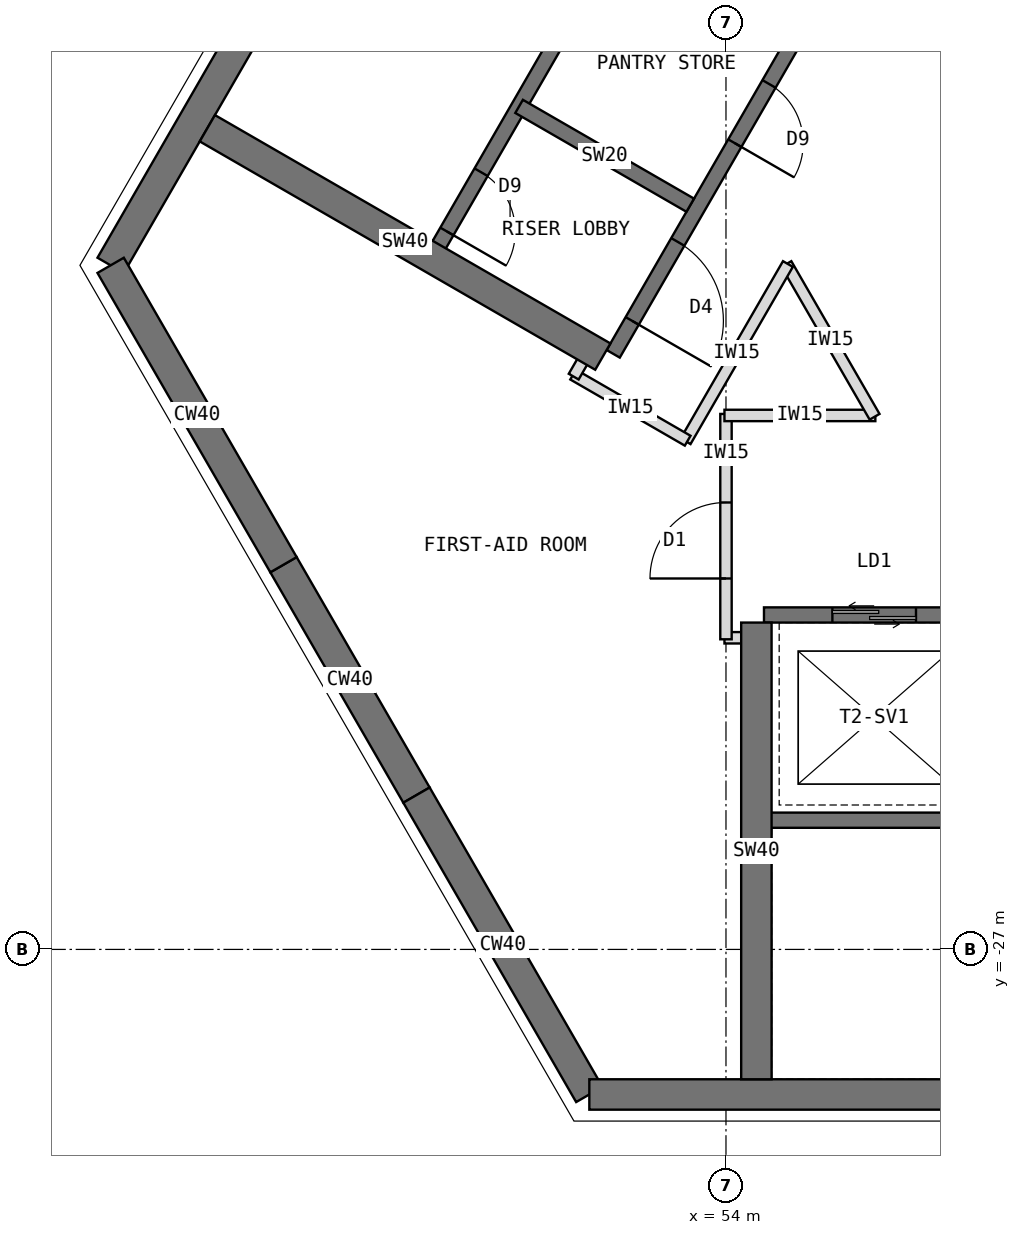
"""IFC4 building model, lengths in metres.
Left out: names, types, materials, properties, quantities, classifications, styles, units other than length and angle.
Written with IfcOpenShell. Run it as: python <this file> out.ifc"""

import sys

from ifc_helpers import new_model, si_unit, direction, frame, frame_2d, origin, place, context, subcontext, project, spatial, rectangle, extrude, element, fill, save


model = new_model("IFC4")
c1 = context("Model", 3, precision=1e-05, world=origin(), true_north=direction((0.0, 1.0)))
c2 = subcontext(c1, "Body", "Model", "MODEL_VIEW")
j1 = project(units=[si_unit("LENGTHUNIT", "METRE"), si_unit("PLANEANGLEUNIT", "RADIAN")], contexts=[c1])
p1 = place(None, origin())
s1 = spatial("IfcSite", under=j1, at=p1, CompositionType="ELEMENT")
p2 = place(p1, origin())
s2 = spatial("IfcBuilding", under=s1, at=p2, CompositionType="ELEMENT")
p3 = place(p2, frame((0.0, 0.0, 279.5)))
s3 = spatial("IfcBuildingStorey", under=s2, at=p3, CompositionType="ELEMENT", Elevation=279.5)
p4 = place(p3, frame((52.202, -7.092, 0.0), z_axis=(0.0, 0.0, 1.0), x_axis=(-0.500005998175, -0.866021940709, 0.0)))
e1 = element("IfcWall", 1, at=p4, inside=s3, PredefinedType="SHEAR", context=c2, shape_type="SweptSolid", body=[
    extrude(rectangle(XDim=12.596, YDim=0.4, at=frame_2d((6.298, 0.0))), origin(), (0.0, 0.0, 1.0), 4.0),
])
p5 = place(p3, frame((45.904, -18.0, 0.0), z_axis=(0.0, 0.0, 1.0), x_axis=(0.500024481964, -0.866011268655, 0.0)))
e2 = element("IfcWall", 2, at=p5, inside=s3, PredefinedType="SHEAR", context=c2, shape_type="SweptSolid", body=[
    extrude(rectangle(XDim=4.548, YDim=0.4, at=frame_2d((2.274, 0.0))), origin(), (0.0, 0.0, 1.0), 4.0),
])
p6 = place(p3, frame((48.178, -21.939, 0.0), z_axis=(0.0, 0.0, 1.0), x_axis=(0.500010275428, -0.866019471182, 0.0)))
e3 = element("IfcWall", 3, at=p6, inside=s3, PredefinedType="SHEAR", context=c2, shape_type="SweptSolid", body=[
    extrude(rectangle(XDim=3.5, YDim=0.4, at=frame_2d((1.75, 0.0))), origin(), (0.0, 0.0, 1.0), 4.0),
])
p7 = place(p3, frame((49.928, -24.97, 0.0), z_axis=(0.0, 0.0, 1.0), x_axis=(0.499984222037, -0.866034513004, 0.0)))
e4 = element("IfcWall", 4, at=p7, inside=s3, PredefinedType="SHEAR", context=c2, shape_type="SweptSolid", body=[
    extrude(rectangle(XDim=4.548, YDim=0.4, at=frame_2d((2.274, 0.0))), origin(), (0.0, 0.0, 1.0), 4.0),
])
p8 = place(p3, frame((52.202, -28.908, 0.0), z_axis=(0.0, 0.0, 1.0), x_axis=(1.0, 0.0, 0.0)))
e5 = element("IfcWall", 5, at=p8, inside=s3, PredefinedType="SHEAR", context=c2, shape_type="SweptSolid", body=[
    extrude(rectangle(XDim=12.596, YDim=0.4, at=frame_2d((6.298, 0.0))), origin(), (0.0, 0.0, 1.0), 4.0),
])
p9 = place(p3, frame((56.516, -12.236, 0.0), z_axis=(0.0, 0.0, 1.0), x_axis=(-0.49999894854, -0.866026010844, 0.0)))
e6 = element("IfcWall", 6, at=p9, inside=s3, PredefinedType="SHEAR", context=c2, shape_type="SweptSolid", body=[
    extrude(rectangle(XDim=8.0, YDim=0.2, at=frame_2d((4.0, 0.0))), origin(), (0.0, 0.0, 1.0), 4.0),
])
p10 = place(p9, frame((6.3, 0.0, 0.0)))
e7 = element("IfcOpeningElement", 7, at=p10, cuts=e6, PredefinedType="OPENING", context=c2, shape_type="SweptSolid", body=[
    extrude(rectangle(XDim=1.2, YDim=2.1, at=frame_2d((0.6, 1.05))), frame((0.0, 0.11, 0.0), z_axis=(0.0, -1.0, 0.0), x_axis=(1.0, 0.0, 0.0)), (0.0, 0.0, 1.0), 0.22),
])
p11 = place(p9, frame((1.0, 0.0, 0.0)))
e8 = element("IfcOpeningElement", 8, at=p11, cuts=e6, PredefinedType="OPENING", context=c2, shape_type="SweptSolid", body=[
    extrude(rectangle(XDim=0.9, YDim=2.1, at=frame_2d((0.45, 1.05))), frame((0.0, 0.11, 0.0), z_axis=(0.0, -1.0, 0.0), x_axis=(1.0, 0.0, 0.0)), (0.0, 0.0, 1.0), 0.22),
])
p12 = place(p9, frame((3.9, 0.0, 0.0)))
e9 = element("IfcOpeningElement", 9, at=p12, cuts=e6, PredefinedType="OPENING", context=c2, shape_type="SweptSolid", body=[
    extrude(rectangle(XDim=0.9, YDim=2.1, at=frame_2d((0.45, 1.05))), frame((0.0, 0.11, 0.0), z_axis=(0.0, -1.0, 0.0), x_axis=(1.0, 0.0, 0.0)), (0.0, 0.0, 1.0), 0.22),
])
p13 = place(p3, frame((53.53, -17.209, 0.0), z_axis=(0.0, 0.0, 1.0), x_axis=(-0.866062058628, 0.499936506574, 0.0)))
e10 = element("IfcWall", 10, at=p13, inside=s3, PredefinedType="SHEAR", context=c2, shape_type="SweptSolid", body=[
    extrude(rectangle(XDim=2.6, YDim=0.2, at=frame_2d((1.3, 0.0))), origin(), (0.0, 0.0, 1.0), 4.0),
])
p14 = place(p3, frame((54.178, -10.886, 0.0), z_axis=(0.0, 0.0, 1.0), x_axis=(-0.49999894854, -0.866026010844, 0.0)))
e11 = element("IfcWall", 11, at=p14, inside=s3, PredefinedType="SHEAR", context=c2, shape_type="SweptSolid", body=[
    extrude(rectangle(XDim=8.0, YDim=0.2, at=frame_2d((4.0, 0.0))), origin(), (0.0, 0.0, 1.0), 4.0),
])
p15 = place(p14, frame((6.8, 0.0, 0.0)))
e12 = element("IfcOpeningElement", 12, at=p15, cuts=e11, PredefinedType="OPENING", context=c2, shape_type="SweptSolid", body=[
    extrude(rectangle(XDim=0.9, YDim=2.1, at=frame_2d((0.45, 1.05))), frame((0.0, 0.11, 0.0), z_axis=(0.0, -1.0, 0.0), x_axis=(1.0, 0.0, 0.0)), (0.0, 0.0, 1.0), 0.22),
])
p16 = place(p3, frame((52.38, -19.201, 0.0), z_axis=(0.0, 0.0, 1.0), x_axis=(-0.866026570101, 0.499997979876, 0.0)))
e13 = element("IfcWall", 13, at=p16, inside=s3, PredefinedType="SHEAR", context=c2, shape_type="SweptSolid", body=[
    extrude(rectangle(XDim=6.008, YDim=0.4, at=frame_2d((3.004, 0.0))), origin(), (0.0, 0.0, 1.0), 4.0),
])
p17 = place(p3, frame((54.5, -22.6, 0.0), z_axis=(0.0, 0.0, 1.0), x_axis=(1.0, 0.0, 0.0)))
e14 = element("IfcWall", 14, at=p17, inside=s3, PredefinedType="SHEAR", context=c2, shape_type="SweptSolid", body=[
    extrude(rectangle(XDim=8.0, YDim=0.2, at=frame_2d((4.0, 0.0))), origin(), (0.0, 0.0, 1.0), 4.0),
])
p18 = place(p17, frame((6.3, 0.0, 0.0)))
e15 = element("IfcOpeningElement", 15, at=p18, cuts=e14, PredefinedType="OPENING", context=c2, shape_type="SweptSolid", body=[
    extrude(rectangle(XDim=1.2, YDim=2.1, at=frame_2d((0.6, 1.05))), frame((0.0, 0.11, 0.0), z_axis=(0.0, -1.0, 0.0), x_axis=(1.0, 0.0, 0.0)), (0.0, 0.0, 1.0), 0.22),
])
p19 = place(p17, frame((0.9, 0.0, 0.0)))
e16 = element("IfcOpeningElement", 16, at=p19, cuts=e14, PredefinedType="OPENING", context=c2, shape_type="SweptSolid", body=[
    extrude(rectangle(XDim=1.1, YDim=2.2, at=frame_2d((0.55, 1.1))), frame((0.0, 0.11, 0.0), z_axis=(0.0, -1.0, 0.0), x_axis=(1.0, 0.0, 0.0)), (0.0, 0.0, 1.0), 0.22),
])
p20 = place(p3, frame((54.5, -25.3, 0.0), z_axis=(0.0, 0.0, 1.0), x_axis=(1.0, 0.0, 0.0)))
e17 = element("IfcWall", 17, at=p20, inside=s3, PredefinedType="SHEAR", context=c2, shape_type="SweptSolid", body=[
    extrude(rectangle(XDim=8.0, YDim=0.2, at=frame_2d((4.0, 0.0))), origin(), (0.0, 0.0, 1.0), 4.0),
])
p21 = place(p20, frame((6.7, 0.0, 0.0)))
e18 = element("IfcOpeningElement", 18, at=p21, cuts=e17, PredefinedType="OPENING", context=c2, shape_type="SweptSolid", body=[
    extrude(rectangle(XDim=1.1, YDim=2.1, at=frame_2d((0.55, 1.05))), frame((0.0, 0.11, 0.0), z_axis=(0.0, -1.0, 0.0), x_axis=(1.0, 0.0, 0.0)), (0.0, 0.0, 1.0), 0.22),
])
p22 = place(p3, frame((54.4, -22.7, 0.0), z_axis=(0.0, 0.0, 1.0), x_axis=(0.0, -1.0, 0.0)))
e19 = element("IfcWall", 19, at=p22, inside=s3, PredefinedType="SHEAR", context=c2, shape_type="SweptSolid", body=[
    extrude(rectangle(XDim=6.008, YDim=0.4, at=frame_2d((3.004, 0.0))), origin(), (0.0, 0.0, 1.0), 4.0),
])
p23 = place(p3, frame((54.41, -22.9, 0.0), z_axis=(0.0, 0.0, 1.0), x_axis=(-1.0, 0.0, 0.0)))
e20 = element("IfcWall", 20, at=p23, inside=s3, PredefinedType="PARTITIONING", context=c2, shape_type="SweptSolid", body=[
    extrude(rectangle(XDim=0.43, YDim=0.15, at=frame_2d((0.215, 0.0))), origin(), (0.0, 0.0, 1.0), 3.8),
])
p24 = place(p3, frame((54.0, -22.92, 0.0), z_axis=(0.0, 0.0, 1.0), x_axis=(0.0, 1.0, 0.0)))
e21 = element("IfcWall", 21, at=p24, inside=s3, PredefinedType="PARTITIONING", context=c2, shape_type="SweptSolid", body=[
    extrude(rectangle(XDim=2.965, YDim=0.15, at=frame_2d((1.482, 0.0))), origin(), (0.0, 0.0, 1.0), 3.8),
])
p25 = place(p24, frame((0.8, 0.0, 0.0)))
e22 = element("IfcOpeningElement", 22, at=p25, cuts=e21, PredefinedType="OPENING", context=c2, shape_type="SweptSolid", body=[
    extrude(rectangle(XDim=1.0, YDim=2.1, at=frame_2d((0.5, 1.05))), frame((0.0, 0.085, 0.0), z_axis=(0.0, -1.0, 0.0), x_axis=(1.0, 0.0, 0.0)), (0.0, 0.0, 1.0), 0.17),
])
p26 = place(p3, frame((53.98, -19.975, 0.0), z_axis=(0.0, 0.0, 1.0), x_axis=(1.0, 0.0, 0.0)))
e23 = element("IfcWall", 23, at=p26, inside=s3, PredefinedType="PARTITIONING", context=c2, shape_type="SweptSolid", body=[
    extrude(rectangle(XDim=1.985, YDim=0.15, at=frame_2d((0.993, 0.0))), origin(), (0.0, 0.0, 1.0), 3.8),
])
p27 = place(p3, frame((55.955, -19.992, 0.0), z_axis=(0.0, 0.0, 1.0), x_axis=(-0.499941024108, 0.866059450854, 0.0)))
e24 = element("IfcWall", 24, at=p27, inside=s3, PredefinedType="PARTITIONING", context=c2, shape_type="SweptSolid", body=[
    extrude(rectangle(XDim=2.321, YDim=0.15, at=frame_2d((1.16, 0.0))), origin(), (0.0, 0.0, 1.0), 3.8),
])
p28 = place(p3, frame((54.815, -17.983, 0.0), z_axis=(0.0, 0.0, 1.0), x_axis=(-0.499981473571, -0.866036099759, 0.0)))
e25 = element("IfcWall", 25, at=p28, inside=s3, PredefinedType="PARTITIONING", context=c2, shape_type="SweptSolid", body=[
    extrude(rectangle(XDim=2.692, YDim=0.15, at=frame_2d((1.346, 0.0))), origin(), (0.0, 0.0, 1.0), 3.8),
])
p29 = place(p3, frame((53.496, -20.307, 0.0), z_axis=(0.0, 0.0, 1.0), x_axis=(-0.865989304205, 0.500062521093, 0.0)))
e26 = element("IfcWall", 26, at=p29, inside=s3, PredefinedType="PARTITIONING", context=c2, shape_type="SweptSolid", body=[
    extrude(rectangle(XDim=1.74, YDim=0.15, at=frame_2d((0.87, 0.0))), origin(), (0.0, 0.0, 1.0), 3.8),
])
p30 = place(p3, frame((51.997, -19.464, 0.0), z_axis=(0.0, 0.0, 1.0), x_axis=(0.499804398801, 0.866138304741, 0.0)))
e27 = element("IfcWall", 27, at=p30, inside=s3, PredefinedType="PARTITIONING", context=c2, shape_type="SweptSolid", body=[
    extrude(rectangle(XDim=0.43, YDim=0.15, at=frame_2d((0.215, 0.0))), origin(), (0.0, 0.0, 1.0), 3.8),
])
p31 = place(p10, origin())
e28 = element("IfcDoor", 28, at=p31, inside=s3, OperationType="SINGLE_SWING_RIGHT", PredefinedType="DOOR", context=c2, shape_type="SweptSolid", body=[
    extrude(rectangle(XDim=1.2, YDim=2.1, at=frame_2d((0.6, 1.05))), frame((0.0, 0.025, 0.0), z_axis=(0.0, -1.0, 0.0), x_axis=(1.0, 0.0, 0.0)), (0.0, 0.0, 1.0), 0.05),
])
fill(e7, e28)
p32 = place(p15, origin())
e29 = element("IfcDoor", 29, at=p32, inside=s3, OperationType="SINGLE_SWING_RIGHT", PredefinedType="DOOR", context=c2, shape_type="SweptSolid", body=[
    extrude(rectangle(XDim=0.9, YDim=2.1, at=frame_2d((0.45, 1.05))), frame((0.0, 0.025, 0.0), z_axis=(0.0, -1.0, 0.0), x_axis=(1.0, 0.0, 0.0)), (0.0, 0.0, 1.0), 0.05),
])
fill(e12, e29)
p33 = place(p19, origin())
e30 = element("IfcDoor", 30, at=p33, inside=s3, OperationType="DOUBLE_DOOR_SLIDING", PredefinedType="DOOR", context=c2, shape_type="SweptSolid", body=[
    extrude(rectangle(XDim=1.1, YDim=2.2, at=frame_2d((0.55, 1.1))), frame((0.0, 0.025, 0.0), z_axis=(0.0, -1.0, 0.0), x_axis=(1.0, 0.0, 0.0)), (0.0, 0.0, 1.0), 0.05),
])
fill(e16, e30)
p34 = place(p25, origin())
e31 = element("IfcDoor", 31, at=p34, inside=s3, OperationType="SINGLE_SWING_LEFT", PredefinedType="DOOR", context=c2, shape_type="SweptSolid", body=[
    extrude(rectangle(XDim=1.0, YDim=2.1, at=frame_2d((0.5, 1.05))), frame((0.0, 0.025, 0.0), z_axis=(0.0, -1.0, 0.0), x_axis=(1.0, 0.0, 0.0)), (0.0, 0.0, 1.0), 0.05),
])
fill(e22, e31)
p35 = place(p12, origin())
e32 = element("IfcDoor", 32, at=p35, inside=s3, OperationType="SINGLE_SWING_RIGHT", PredefinedType="DOOR", context=c2, shape_type="SweptSolid", body=[
    extrude(rectangle(XDim=0.9, YDim=2.1, at=frame_2d((0.45, 1.05))), frame((0.0, 0.025, 0.0), z_axis=(0.0, -1.0, 0.0), x_axis=(1.0, 0.0, 0.0)), (0.0, 0.0, 1.0), 0.05),
])
fill(e9, e32)
save(model, sys.argv[1])
